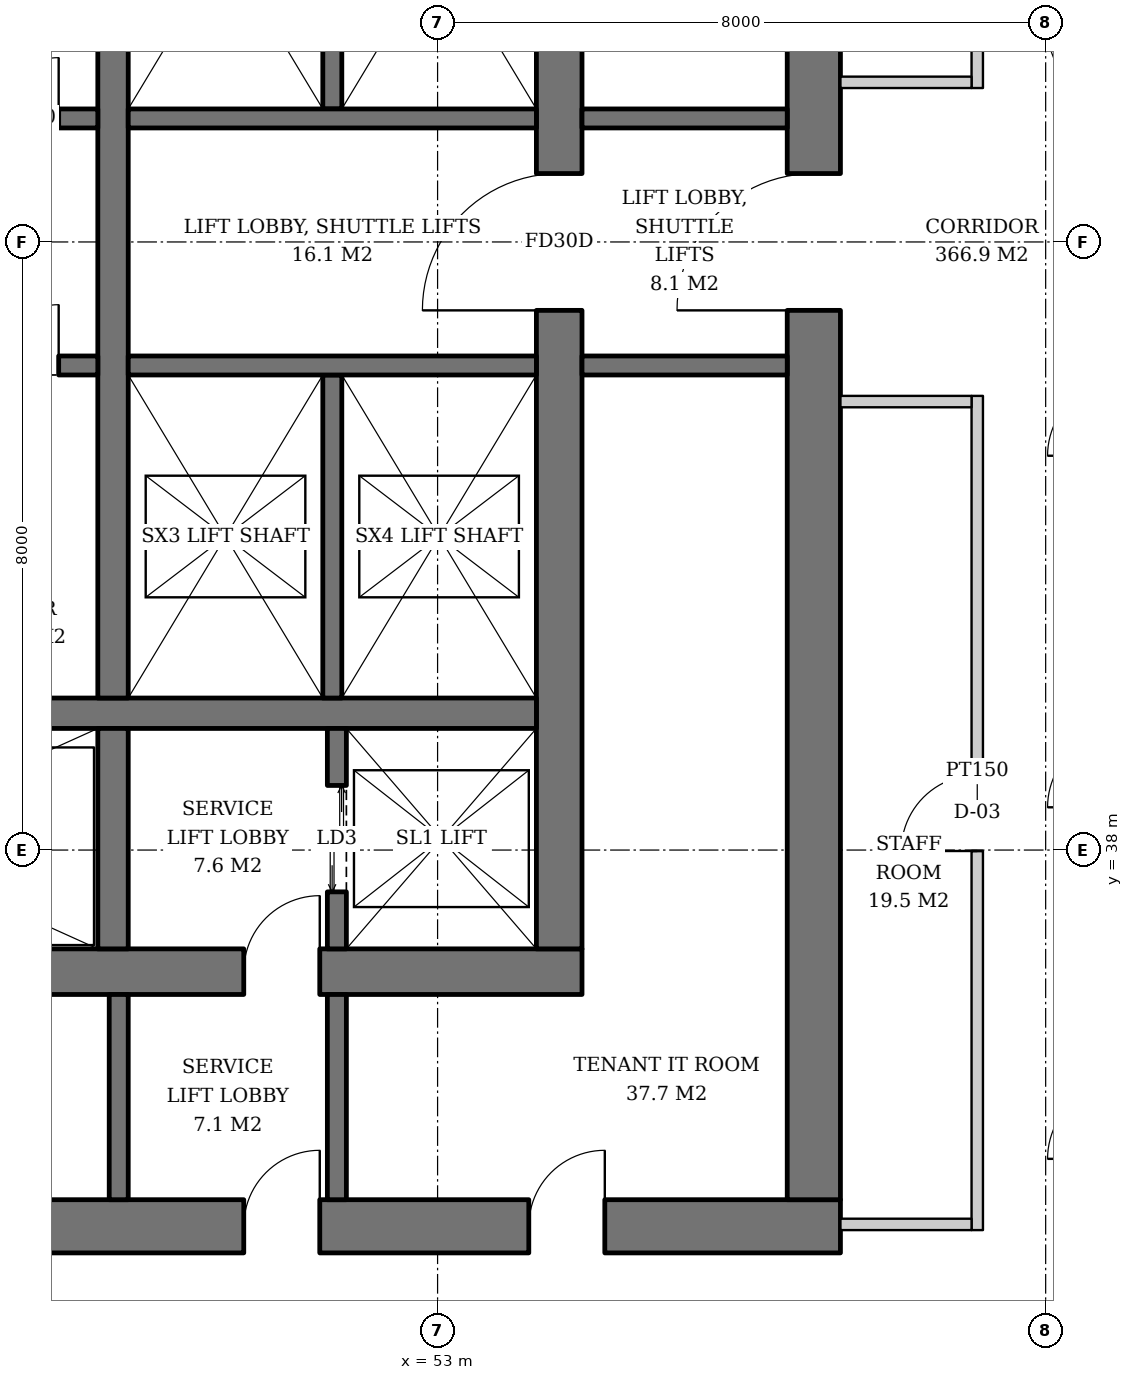
"""IFC4 building model, lengths in metres.
Left out: names, types, materials, properties, quantities, classifications, styles, units other than length and angle.
Written with IfcOpenShell. Run it as: python <this file> out.ifc"""

import sys

from ifc_helpers import new_model, si_unit, direction, frame, frame_2d, origin, place, context, subcontext, project, spatial, rectangle, extrude, element, fill, save


model = new_model("IFC4")
c1 = context("Model", 3, precision=1e-05, world=origin(), true_north=direction((0.0, 1.0)))
c2 = subcontext(c1, "Body", "Model", "MODEL_VIEW")
j1 = project(units=[si_unit("LENGTHUNIT", "METRE"), si_unit("PLANEANGLEUNIT", "RADIAN")], contexts=[c1])
p1 = place(None, origin())
s1 = spatial("IfcSite", under=j1, at=p1, CompositionType="ELEMENT")
p2 = place(p1, origin())
s2 = spatial("IfcBuilding", under=s1, at=p2, CompositionType="ELEMENT")
p3 = place(p2, frame((0.0, 0.0, 146.4)))
s3 = spatial("IfcBuildingStorey", under=s2, at=p3, CompositionType="ELEMENT", Elevation=146.4)
p4 = place(p3, frame((35.1, 36.4, 0.0), z_axis=(0.0, 0.0, 1.0), x_axis=(1.0, 0.0, 0.0)))
e1 = element("IfcWall", 1, at=p4, inside=s3, PredefinedType="SHEAR", context=c2, shape_type="SweptSolid", body=[
    extrude(rectangle(XDim=19.8, YDim=0.6, at=frame_2d((9.9, 0.0))), origin(), (0.0, 0.0, 1.0), 3.8),
])
p5 = place(p4, frame((3.9, 0.0, 0.0)))
e2 = element("IfcOpeningElement", 2, at=p5, cuts=e1, PredefinedType="OPENING", context=c2, shape_type="SweptSolid", body=[
    extrude(rectangle(XDim=1.0, YDim=2.1, at=frame_2d((0.5, 1.05))), frame((0.0, 0.31, 0.0), z_axis=(0.0, -1.0, 0.0), x_axis=(1.0, 0.0, 0.0)), (0.0, 0.0, 1.0), 0.62),
])
p6 = place(p4, frame((15.35, 0.0, 0.0)))
e3 = element("IfcOpeningElement", 3, at=p6, cuts=e1, PredefinedType="OPENING", context=c2, shape_type="SweptSolid", body=[
    extrude(rectangle(XDim=1.0, YDim=2.1, at=frame_2d((0.5, 1.05))), frame((0.0, 0.31, 0.0), z_axis=(0.0, -1.0, 0.0), x_axis=(1.0, 0.0, 0.0)), (0.0, 0.0, 1.0), 0.62),
])
p7 = place(p3, frame((54.6, 36.7, 0.0), z_axis=(0.0, 0.0, 1.0), x_axis=(0.0, 1.0, 0.0)))
e4 = element("IfcWall", 4, at=p7, inside=s3, PredefinedType="SHEAR", context=c2, shape_type="SweptSolid", body=[
    extrude(rectangle(XDim=18.6, YDim=0.6, at=frame_2d((9.3, 0.0))), origin(), (0.0, 0.0, 1.0), 3.8),
])
p8 = place(p7, frame((8.4, 0.0, 0.0)))
e5 = element("IfcOpeningElement", 5, at=p8, cuts=e4, PredefinedType="OPENING", context=c2, shape_type="SweptSolid", body=[
    extrude(rectangle(XDim=1.8, YDim=2.4, at=frame_2d((0.9, 1.2))), frame((0.0, 0.31, 0.0), z_axis=(0.0, -1.0, 0.0), x_axis=(1.0, 0.0, 0.0)), (0.0, 0.0, 1.0), 0.62),
])
p9 = place(p3, frame((31.7, 33.05, 0.0), z_axis=(0.0, 0.0, 1.0), x_axis=(1.0, 0.0, 0.0)))
e6 = element("IfcWall", 6, at=p9, inside=s3, PredefinedType="SHEAR", context=c2, shape_type="SweptSolid", body=[
    extrude(rectangle(XDim=26.6, YDim=0.7, at=frame_2d((13.3, 0.0))), origin(), (0.0, 0.0, 1.0), 3.8),
])
p10 = place(p9, frame((7.3, 0.0, 0.0)))
e7 = element("IfcOpeningElement", 7, at=p10, cuts=e6, PredefinedType="OPENING", context=c2, shape_type="SweptSolid", body=[
    extrude(rectangle(XDim=1.0, YDim=2.1, at=frame_2d((0.5, 1.05))), frame((0.0, 0.36, 0.0), z_axis=(0.0, -1.0, 0.0), x_axis=(1.0, 0.0, 0.0)), (0.0, 0.0, 1.0), 0.72),
])
p11 = place(p9, frame((18.75, 0.0, 0.0)))
e8 = element("IfcOpeningElement", 8, at=p11, cuts=e6, PredefinedType="OPENING", context=c2, shape_type="SweptSolid", body=[
    extrude(rectangle(XDim=1.0, YDim=2.1, at=frame_2d((0.5, 1.05))), frame((0.0, 0.36, 0.0), z_axis=(0.0, -1.0, 0.0), x_axis=(1.0, 0.0, 0.0)), (0.0, 0.0, 1.0), 0.72),
])
p12 = place(p9, frame((3.2, 0.0, 0.0)))
e9 = element("IfcOpeningElement", 9, at=p12, cuts=e6, PredefinedType="OPENING", context=c2, shape_type="SweptSolid", body=[
    extrude(rectangle(XDim=1.0, YDim=2.1, at=frame_2d((0.5, 1.05))), frame((0.0, 0.36, 0.0), z_axis=(0.0, -1.0, 0.0), x_axis=(1.0, 0.0, 0.0)), (0.0, 0.0, 1.0), 0.72),
])
p13 = place(p9, frame((10.42, 0.0, 0.0)))
e10 = element("IfcOpeningElement", 10, at=p13, cuts=e6, PredefinedType="OPENING", context=c2, shape_type="SweptSolid", body=[
    extrude(rectangle(XDim=1.0, YDim=2.1, at=frame_2d((0.5, 1.05))), frame((0.0, 0.36, 0.0), z_axis=(0.0, -1.0, 0.0), x_axis=(1.0, 0.0, 0.0)), (0.0, 0.0, 1.0), 0.72),
])
p14 = place(p9, frame((14.46, 0.0, 0.0)))
e11 = element("IfcOpeningElement", 11, at=p14, cuts=e6, PredefinedType="OPENING", context=c2, shape_type="SweptSolid", body=[
    extrude(rectangle(XDim=1.0, YDim=2.1, at=frame_2d((0.5, 1.05))), frame((0.0, 0.36, 0.0), z_axis=(0.0, -1.0, 0.0), x_axis=(1.0, 0.0, 0.0)), (0.0, 0.0, 1.0), 0.72),
])
p15 = place(p9, frame((22.5, 0.0, 0.0)))
e12 = element("IfcOpeningElement", 12, at=p15, cuts=e6, PredefinedType="OPENING", context=c2, shape_type="SweptSolid", body=[
    extrude(rectangle(XDim=1.0, YDim=2.1, at=frame_2d((0.5, 1.05))), frame((0.0, 0.36, 0.0), z_axis=(0.0, -1.0, 0.0), x_axis=(1.0, 0.0, 0.0)), (0.0, 0.0, 1.0), 0.72),
])
p16 = place(p3, frame((57.95, 33.4, 0.0), z_axis=(0.0, 0.0, 1.0), x_axis=(0.0, 1.0, 0.0)))
e13 = element("IfcWall", 13, at=p16, inside=s3, PredefinedType="SHEAR", context=c2, shape_type="SweptSolid", body=[
    extrude(rectangle(XDim=25.2, YDim=0.7, at=frame_2d((12.6, 0.0))), origin(), (0.0, 0.0, 1.0), 3.8),
])
p17 = place(p16, frame((11.7, 0.0, 0.0)))
e14 = element("IfcOpeningElement", 14, at=p17, cuts=e13, PredefinedType="OPENING", context=c2, shape_type="SweptSolid", body=[
    extrude(rectangle(XDim=1.8, YDim=2.4, at=frame_2d((0.9, 1.2))), frame((0.0, 0.36, 0.0), z_axis=(0.0, -1.0, 0.0), x_axis=(1.0, 0.0, 0.0)), (0.0, 0.0, 1.0), 0.72),
])
p18 = place(p3, frame((35.7, 39.8, 0.0), z_axis=(0.0, 0.0, 1.0), x_axis=(1.0, 0.0, 0.0)))
e15 = element("IfcWall", 15, at=p18, inside=s3, PredefinedType="SHEAR", context=c2, shape_type="SweptSolid", body=[
    extrude(rectangle(XDim=18.6, YDim=0.4, at=frame_2d((9.3, 0.0))), origin(), (0.0, 0.0, 1.0), 3.8),
])
p19 = place(p3, frame((48.73, 36.7, 0.0), z_axis=(0.0, 0.0, 1.0), x_axis=(0.0, 1.0, 0.0)))
e16 = element("IfcWall", 16, at=p19, inside=s3, PredefinedType="SHEAR", context=c2, shape_type="SweptSolid", body=[
    extrude(rectangle(XDim=2.9, YDim=0.4, at=frame_2d((1.45, 0.0))), origin(), (0.0, 0.0, 1.0), 3.8),
])
p20 = place(p3, frame((48.73, 40.0, 0.0), z_axis=(0.0, 0.0, 1.0), x_axis=(0.0, 1.0, 0.0)))
e17 = element("IfcWall", 17, at=p20, inside=s3, PredefinedType="SHEAR", context=c2, shape_type="SweptSolid", body=[
    extrude(rectangle(XDim=12.0, YDim=0.4, at=frame_2d((6.0, 0.0))), origin(), (0.0, 0.0, 1.0), 3.8),
])
p21 = place(p3, frame((51.675, 36.7, 0.0), z_axis=(0.0, 0.0, 1.0), x_axis=(0.0, 1.0, 0.0)))
e18 = element("IfcWall", 18, at=p21, inside=s3, PredefinedType="SHEAR", context=c2, shape_type="SweptSolid", body=[
    extrude(rectangle(XDim=2.9, YDim=0.25, at=frame_2d((1.45, 0.0))), origin(), (0.0, 0.0, 1.0), 3.8),
])
p22 = place(p21, frame((0.75, 0.0, 0.0)))
e19 = element("IfcOpeningElement", 19, at=p22, cuts=e18, PredefinedType="OPENING", context=c2, shape_type="SweptSolid", body=[
    extrude(rectangle(XDim=1.4, YDim=2.4, at=frame_2d((0.7, 1.2))), frame((0.0, 0.135, 0.0), z_axis=(0.0, -1.0, 0.0), x_axis=(1.0, 0.0, 0.0)), (0.0, 0.0, 1.0), 0.27),
])
p23 = place(p3, frame((35.7, 47.625, 0.0), z_axis=(0.0, 0.0, 1.0), x_axis=(1.0, 0.0, 0.0)))
e20 = element("IfcWall", 20, at=p23, inside=s3, PredefinedType="SHEAR", context=c2, shape_type="SweptSolid", body=[
    extrude(rectangle(XDim=12.83, YDim=0.25, at=frame_2d((6.415, 0.0))), origin(), (0.0, 0.0, 1.0), 3.8),
])
p24 = place(p23, frame((0.7, 0.0, 0.0)))
e21 = element("IfcOpeningElement", 21, at=p24, cuts=e20, PredefinedType="OPENING", context=c2, shape_type="SweptSolid", body=[
    extrude(rectangle(XDim=1.1, YDim=2.2, at=frame_2d((0.55, 1.1))), frame((0.0, 0.135, 0.0), z_axis=(0.0, -1.0, 0.0), x_axis=(1.0, 0.0, 0.0)), (0.0, 0.0, 1.0), 0.27),
])
p25 = place(p23, frame((3.45, 0.0, 0.0)))
e22 = element("IfcOpeningElement", 22, at=p25, cuts=e20, PredefinedType="OPENING", context=c2, shape_type="SweptSolid", body=[
    extrude(rectangle(XDim=1.1, YDim=2.2, at=frame_2d((0.55, 1.1))), frame((0.0, 0.135, 0.0), z_axis=(0.0, -1.0, 0.0), x_axis=(1.0, 0.0, 0.0)), (0.0, 0.0, 1.0), 0.27),
])
p26 = place(p23, frame((6.2, 0.0, 0.0)))
e23 = element("IfcOpeningElement", 23, at=p26, cuts=e20, PredefinedType="OPENING", context=c2, shape_type="SweptSolid", body=[
    extrude(rectangle(XDim=1.1, YDim=2.2, at=frame_2d((0.55, 1.1))), frame((0.0, 0.135, 0.0), z_axis=(0.0, -1.0, 0.0), x_axis=(1.0, 0.0, 0.0)), (0.0, 0.0, 1.0), 0.27),
])
p27 = place(p23, frame((8.95, 0.0, 0.0)))
e24 = element("IfcOpeningElement", 24, at=p27, cuts=e20, PredefinedType="OPENING", context=c2, shape_type="SweptSolid", body=[
    extrude(rectangle(XDim=1.1, YDim=2.2, at=frame_2d((0.55, 1.1))), frame((0.0, 0.135, 0.0), z_axis=(0.0, -1.0, 0.0), x_axis=(1.0, 0.0, 0.0)), (0.0, 0.0, 1.0), 0.27),
])
p28 = place(p23, frame((11.515, 0.0, 0.0)))
e25 = element("IfcOpeningElement", 25, at=p28, cuts=e20, PredefinedType="OPENING", context=c2, shape_type="SweptSolid", body=[
    extrude(rectangle(XDim=0.8, YDim=2.0, at=frame_2d((0.4, 1.0))), frame((0.0, 0.135, 0.0), z_axis=(0.0, -1.0, 0.0), x_axis=(1.0, 0.0, 0.0)), (0.0, 0.0, 1.0), 0.27),
])
p29 = place(p3, frame((35.7, 44.375, 0.0), z_axis=(0.0, 0.0, 1.0), x_axis=(1.0, 0.0, 0.0)))
e26 = element("IfcWall", 26, at=p29, inside=s3, PredefinedType="SHEAR", context=c2, shape_type="SweptSolid", body=[
    extrude(rectangle(XDim=12.83, YDim=0.25, at=frame_2d((6.415, 0.0))), origin(), (0.0, 0.0, 1.0), 3.8),
])
p30 = place(p29, frame((0.7, 0.0, 0.0)))
e27 = element("IfcOpeningElement", 27, at=p30, cuts=e26, PredefinedType="OPENING", context=c2, shape_type="SweptSolid", body=[
    extrude(rectangle(XDim=1.1, YDim=2.2, at=frame_2d((0.55, 1.1))), frame((0.0, 0.135, 0.0), z_axis=(0.0, -1.0, 0.0), x_axis=(1.0, 0.0, 0.0)), (0.0, 0.0, 1.0), 0.27),
])
p31 = place(p29, frame((3.45, 0.0, 0.0)))
e28 = element("IfcOpeningElement", 28, at=p31, cuts=e26, PredefinedType="OPENING", context=c2, shape_type="SweptSolid", body=[
    extrude(rectangle(XDim=1.1, YDim=2.2, at=frame_2d((0.55, 1.1))), frame((0.0, 0.135, 0.0), z_axis=(0.0, -1.0, 0.0), x_axis=(1.0, 0.0, 0.0)), (0.0, 0.0, 1.0), 0.27),
])
p32 = place(p29, frame((6.2, 0.0, 0.0)))
e29 = element("IfcOpeningElement", 29, at=p32, cuts=e26, PredefinedType="OPENING", context=c2, shape_type="SweptSolid", body=[
    extrude(rectangle(XDim=1.1, YDim=2.2, at=frame_2d((0.55, 1.1))), frame((0.0, 0.135, 0.0), z_axis=(0.0, -1.0, 0.0), x_axis=(1.0, 0.0, 0.0)), (0.0, 0.0, 1.0), 0.27),
])
p33 = place(p29, frame((8.95, 0.0, 0.0)))
e30 = element("IfcOpeningElement", 30, at=p33, cuts=e26, PredefinedType="OPENING", context=c2, shape_type="SweptSolid", body=[
    extrude(rectangle(XDim=1.1, YDim=2.2, at=frame_2d((0.55, 1.1))), frame((0.0, 0.135, 0.0), z_axis=(0.0, -1.0, 0.0), x_axis=(1.0, 0.0, 0.0)), (0.0, 0.0, 1.0), 0.27),
])
p34 = place(p29, frame((11.515, 0.0, 0.0)))
e31 = element("IfcOpeningElement", 31, at=p34, cuts=e26, PredefinedType="OPENING", context=c2, shape_type="SweptSolid", body=[
    extrude(rectangle(XDim=0.8, YDim=2.0, at=frame_2d((0.4, 1.0))), frame((0.0, 0.135, 0.0), z_axis=(0.0, -1.0, 0.0), x_axis=(1.0, 0.0, 0.0)), (0.0, 0.0, 1.0), 0.27),
])
p35 = place(p3, frame((51.615, 47.75, 0.0), z_axis=(0.0, 0.0, 1.0), x_axis=(0.0, 1.0, 0.0)))
e32 = element("IfcWall", 32, at=p35, inside=s3, PredefinedType="SHEAR", context=c2, shape_type="SweptSolid", body=[
    extrude(rectangle(XDim=4.25, YDim=0.25, at=frame_2d((2.125, 0.0))), origin(), (0.0, 0.0, 1.0), 3.8),
])
p36 = place(p3, frame((48.93, 47.625, 0.0), z_axis=(0.0, 0.0, 1.0), x_axis=(1.0, 0.0, 0.0)))
e33 = element("IfcWall", 33, at=p36, inside=s3, PredefinedType="SHEAR", context=c2, shape_type="SweptSolid", body=[
    extrude(rectangle(XDim=5.37, YDim=0.25, at=frame_2d((2.685, 0.0))), origin(), (0.0, 0.0, 1.0), 3.8),
])
p37 = place(p3, frame((51.615, 44.25, 0.0), z_axis=(0.0, 0.0, 1.0), x_axis=(0.0, -1.0, 0.0)))
e34 = element("IfcWall", 34, at=p37, inside=s3, PredefinedType="SHEAR", context=c2, shape_type="SweptSolid", body=[
    extrude(rectangle(XDim=4.25, YDim=0.25, at=frame_2d((2.125, 0.0))), origin(), (0.0, 0.0, 1.0), 3.8),
])
p38 = place(p3, frame((48.93, 44.375, 0.0), z_axis=(0.0, 0.0, 1.0), x_axis=(1.0, 0.0, 0.0)))
e35 = element("IfcWall", 35, at=p38, inside=s3, PredefinedType="SHEAR", context=c2, shape_type="SweptSolid", body=[
    extrude(rectangle(XDim=5.37, YDim=0.25, at=frame_2d((2.685, 0.0))), origin(), (0.0, 0.0, 1.0), 3.8),
])
for number, where, z_axis, x_axis in (
    (36, (54.9, 44.375, 0.0), (0.0, 0.0, 1.0), (1.0, 0.0, 0.0)),
    (37, (54.9, 47.625, 0.0), (0.0, 0.0, 1.0), (1.0, 0.0, 0.0)),
    (38, (48.805, 33.4, 0.0), (0.0, 0.0, 1.0), (0.0, 1.0, 0.0)),
    (39, (51.675, 33.4, 0.0), (0.0, 0.0, 1.0), (0.0, 1.0, 0.0)),
):
    element("IfcWall", number, at=place(p3, frame(where, z_axis=z_axis, x_axis=x_axis)), inside=s3, PredefinedType="SOLIDWALL", context=c2, shape_type="SweptSolid", body=[
        extrude(rectangle(XDim=2.7, YDim=0.25, at=frame_2d((1.35, 0.0))), origin(), (0.0, 0.0, 1.0), 3.62),
    ])
p39 = place(p3, frame((60.1, 33.0, 0.0), z_axis=(0.0, 0.0, 1.0), x_axis=(0.0, 1.0, 0.0)))
e40 = element("IfcWall", 40, at=p39, inside=s3, PredefinedType="PARTITIONING", context=c2, shape_type="SweptSolid", body=[
    extrude(rectangle(XDim=10.975, YDim=0.15, at=frame_2d((5.488, 0.0))), origin(), (0.0, 0.0, 1.0), 2.72),
])
p40 = place(p39, frame((4.988, 0.0, 0.0)))
e41 = element("IfcOpeningElement", 41, at=p40, cuts=e40, PredefinedType="OPENING", context=c2, shape_type="SweptSolid", body=[
    extrude(rectangle(XDim=1.0, YDim=2.1, at=frame_2d((0.5, 1.05))), frame((0.0, 0.085, 0.0), z_axis=(0.0, -1.0, 0.0), x_axis=(1.0, 0.0, 0.0)), (0.0, 0.0, 1.0), 0.17),
])
p41 = place(p3, frame((58.3, 33.075, 0.0), z_axis=(0.0, 0.0, 1.0), x_axis=(1.0, 0.0, 0.0)))
e42 = element("IfcWall", 42, at=p41, inside=s3, PredefinedType="PARTITIONING", context=c2, shape_type="SweptSolid", body=[
    extrude(rectangle(XDim=1.725, YDim=0.15, at=frame_2d((0.862, 0.0))), origin(), (0.0, 0.0, 1.0), 2.72),
])
p42 = place(p3, frame((58.3, 43.9, 0.0), z_axis=(0.0, 0.0, 1.0), x_axis=(1.0, 0.0, 0.0)))
e43 = element("IfcWall", 43, at=p42, inside=s3, PredefinedType="PARTITIONING", context=c2, shape_type="SweptSolid", body=[
    extrude(rectangle(XDim=1.725, YDim=0.15, at=frame_2d((0.862, 0.0))), origin(), (0.0, 0.0, 1.0), 3.62),
])
p43 = place(p3, frame((60.1, 48.025, 0.0), z_axis=(0.0, 0.0, 1.0), x_axis=(0.0, 1.0, 0.0)))
e44 = element("IfcWall", 44, at=p43, inside=s3, PredefinedType="PARTITIONING", context=c2, shape_type="SweptSolid", body=[
    extrude(rectangle(XDim=10.975, YDim=0.15, at=frame_2d((5.488, 0.0))), origin(), (0.0, 0.0, 1.0), 2.806),
])
p44 = place(p43, frame((4.988, 0.0, 0.0)))
e45 = element("IfcOpeningElement", 45, at=p44, cuts=e44, PredefinedType="OPENING", context=c2, shape_type="SweptSolid", body=[
    extrude(rectangle(XDim=1.0, YDim=2.1, at=frame_2d((0.5, 1.05))), frame((0.0, 0.085, 0.0), z_axis=(0.0, -1.0, 0.0), x_axis=(1.0, 0.0, 0.0)), (0.0, 0.0, 1.0), 0.17),
])
p45 = place(p3, frame((58.3, 48.1, 0.0), z_axis=(0.0, 0.0, 1.0), x_axis=(1.0, 0.0, 0.0)))
e46 = element("IfcWall", 46, at=p45, inside=s3, PredefinedType="PARTITIONING", context=c2, shape_type="SweptSolid", body=[
    extrude(rectangle(XDim=1.725, YDim=0.15, at=frame_2d((0.862, 0.0))), origin(), (0.0, 0.0, 1.0), 3.62),
])
p46 = place(p22, origin())
e47 = element("IfcDoor", 47, at=p46, inside=s3, OperationType="DOUBLE_DOOR_SLIDING", PredefinedType="DOOR", context=c2, shape_type="SweptSolid", body=[
    extrude(rectangle(XDim=1.4, YDim=2.4, at=frame_2d((0.7, 1.2))), frame((0.0, 0.025, 0.0), z_axis=(0.0, -1.0, 0.0), x_axis=(1.0, 0.0, 0.0)), (0.0, 0.0, 1.0), 0.05),
])
fill(e19, e47)
p47 = place(p28, origin())
e48 = element("IfcDoor", 48, at=p47, inside=s3, OperationType="SINGLE_SWING_RIGHT", PredefinedType="DOOR", context=c2, shape_type="SweptSolid", body=[
    extrude(rectangle(XDim=0.8, YDim=2.0, at=frame_2d((0.4, 1.0))), frame((0.0, 0.025, 0.0), z_axis=(0.0, -1.0, 0.0), x_axis=(1.0, 0.0, 0.0)), (0.0, 0.0, 1.0), 0.05),
])
fill(e25, e48)
p48 = place(p34, origin())
e49 = element("IfcDoor", 49, at=p48, inside=s3, OperationType="SINGLE_SWING_RIGHT", PredefinedType="DOOR", context=c2, shape_type="SweptSolid", body=[
    extrude(rectangle(XDim=0.8, YDim=2.0, at=frame_2d((0.4, 1.0))), frame((0.0, 0.025, 0.0), z_axis=(0.0, -1.0, 0.0), x_axis=(1.0, 0.0, 0.0)), (0.0, 0.0, 1.0), 0.05),
])
fill(e31, e49)
p49 = place(p8, origin())
e50 = element("IfcDoor", 50, at=p49, inside=s3, OperationType="DOUBLE_DOOR_SINGLE_SWING", PredefinedType="DOOR", context=c2, shape_type="SweptSolid", body=[
    extrude(rectangle(XDim=1.8, YDim=2.4, at=frame_2d((0.9, 1.2))), frame((0.0, 0.025, 0.0), z_axis=(0.0, -1.0, 0.0), x_axis=(1.0, 0.0, 0.0)), (0.0, 0.0, 1.0), 0.05),
])
fill(e5, e50)
p50 = place(p6, origin())
e51 = element("IfcDoor", 51, at=p50, inside=s3, OperationType="SINGLE_SWING_RIGHT", PredefinedType="DOOR", context=c2, shape_type="SweptSolid", body=[
    extrude(rectangle(XDim=1.0, YDim=2.1, at=frame_2d((0.5, 1.05))), frame((0.0, 0.025, 0.0), z_axis=(0.0, -1.0, 0.0), x_axis=(1.0, 0.0, 0.0)), (0.0, 0.0, 1.0), 0.05),
])
fill(e3, e51)
p51 = place(p17, origin())
e52 = element("IfcDoor", 52, at=p51, inside=s3, OperationType="DOUBLE_DOOR_SINGLE_SWING", PredefinedType="DOOR", context=c2, shape_type="SweptSolid", body=[
    extrude(rectangle(XDim=1.8, YDim=2.4, at=frame_2d((0.9, 1.2))), frame((0.0, 0.025, 0.0), z_axis=(0.0, -1.0, 0.0), x_axis=(1.0, 0.0, 0.0)), (0.0, 0.0, 1.0), 0.05),
])
fill(e14, e52)
p52 = place(p11, origin())
e53 = element("IfcDoor", 53, at=p52, inside=s3, OperationType="SINGLE_SWING_RIGHT", PredefinedType="DOOR", context=c2, shape_type="SweptSolid", body=[
    extrude(rectangle(XDim=1.0, YDim=2.1, at=frame_2d((0.5, 1.05))), frame((0.0, 0.025, 0.0), z_axis=(0.0, -1.0, 0.0), x_axis=(1.0, 0.0, 0.0)), (0.0, 0.0, 1.0), 0.05),
])
fill(e8, e53)
p53 = place(p15, origin())
e54 = element("IfcDoor", 54, at=p53, inside=s3, OperationType="SINGLE_SWING_RIGHT", PredefinedType="DOOR", context=c2, shape_type="SweptSolid", body=[
    extrude(rectangle(XDim=1.0, YDim=2.1, at=frame_2d((0.5, 1.05))), frame((0.0, 0.34, 0.0), z_axis=(0.0, -1.0, 0.0), x_axis=(1.0, 0.0, 0.0)), (0.0, 0.0, 1.0), 0.05),
])
fill(e12, e54)
p54 = place(p40, origin())
e55 = element("IfcDoor", 55, at=p54, inside=s3, OperationType="SINGLE_SWING_LEFT", PredefinedType="DOOR", context=c2, shape_type="SweptSolid", body=[
    extrude(rectangle(XDim=1.0, YDim=2.1, at=frame_2d((0.5, 1.05))), frame((0.0, 0.025, 0.0), z_axis=(0.0, -1.0, 0.0), x_axis=(1.0, 0.0, 0.0)), (0.0, 0.0, 1.0), 0.05),
])
fill(e41, e55)
save(model, sys.argv[1])
